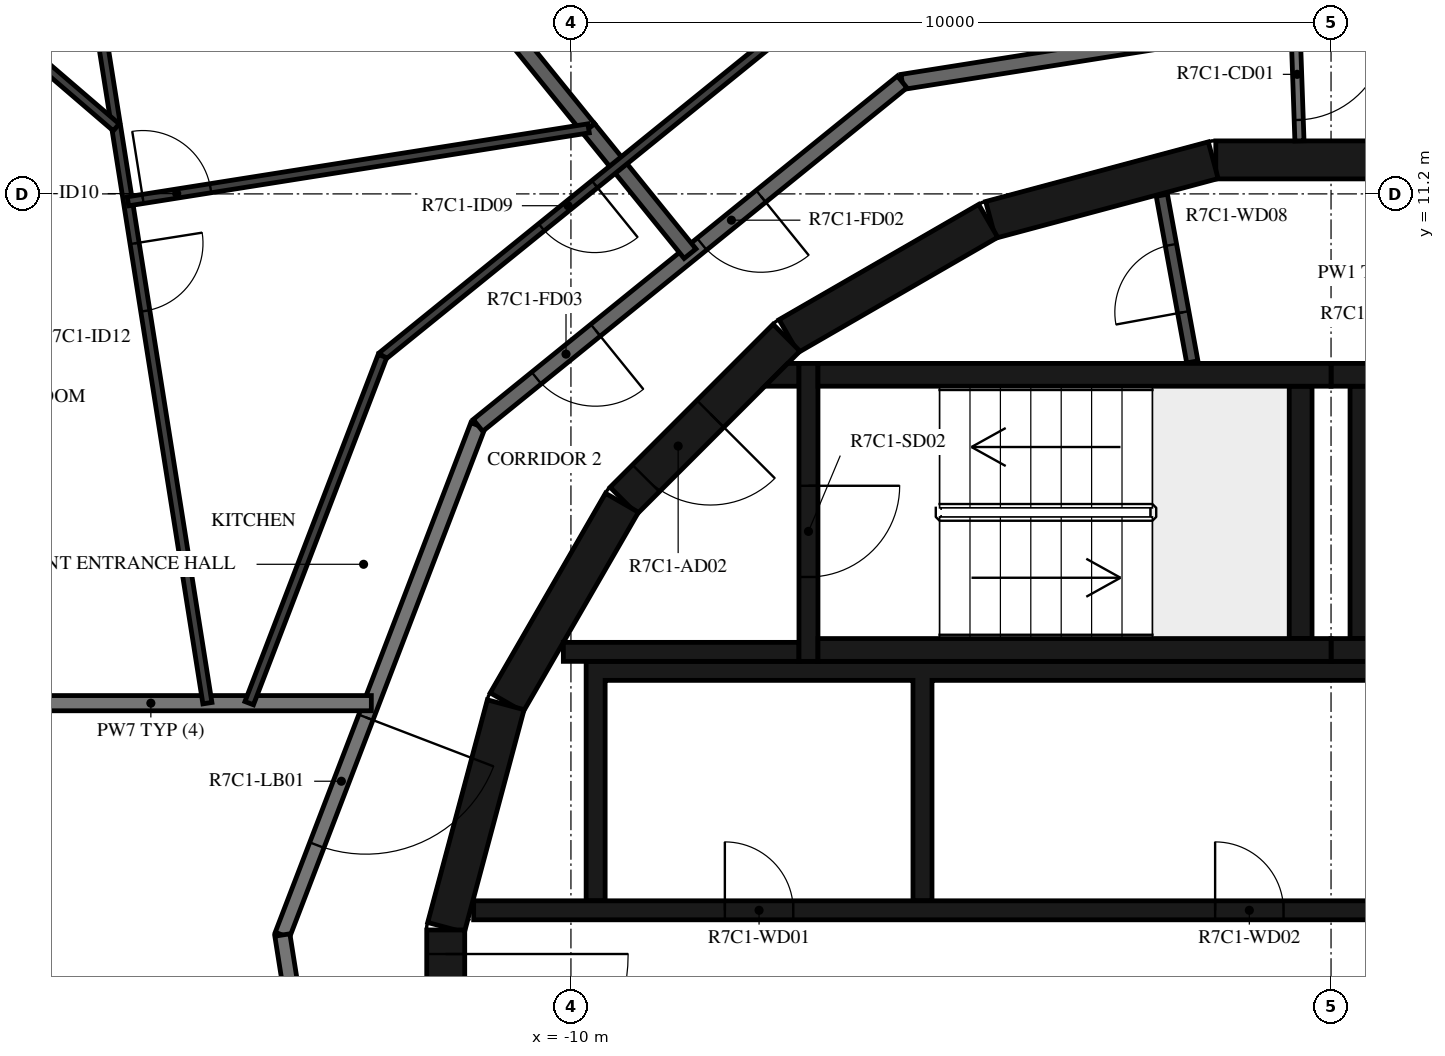
"""IFC4 building model, lengths in metres.
Left out: names, types, materials, properties, quantities, classifications, styles, units other than length and angle.
Written with IfcOpenShell. Run it as: python <this file> out.ifc"""

import sys

from ifc_helpers import new_model, si_unit, direction, frame, frame_2d, origin, place, context, subcontext, project, spatial, polyline, rectangle, outline, extrude, element, fill, save


model = new_model("IFC4")
c1 = context("Model", 3, precision=1e-05, world=origin(), true_north=direction((0.0, 1.0)))
c2 = subcontext(c1, "Body", "Model", "MODEL_VIEW")
j1 = project(units=[si_unit("LENGTHUNIT", "METRE"), si_unit("PLANEANGLEUNIT", "RADIAN")], contexts=[c1])
p1 = place(None, origin())
s1 = spatial("IfcSite", under=j1, at=p1, CompositionType="ELEMENT")
p2 = place(p1, origin())
s2 = spatial("IfcBuilding", under=s1, at=p2, CompositionType="ELEMENT")
p3 = place(p2, frame((0.0, 0.0, 287.9)))
s3 = spatial("IfcBuildingStorey", under=s2, at=p3, CompositionType="ELEMENT", Elevation=287.9)
for number, where, z_axis, x_axis in (
    (1, (1.516, 11.647, 0.0), (0.0, 0.0, 1.0), (-1.0, 0.0, 0.0)),
    (2, (-1.55, 11.643, 0.0), (0.0, 0.0, 1.0), (-0.966, -0.259, 0.0)),
    (3, (-4.51, 10.845, 0.0), (0.0, 0.0, 1.0), (-0.866, -0.5, 0.0)),
):
    element("IfcWall", number, at=place(p3, frame(where, z_axis=z_axis, x_axis=x_axis)), inside=s3, PredefinedType="SHEAR", context=c2, shape_type="SweptSolid", body=[
        extrude(rectangle(XDim=3.033, YDim=0.5, at=frame_2d((1.516, 0.0))), origin(), (0.0, 0.0, 1.0), 3.05),
    ])
p4 = place(p3, frame((-7.164, 9.308, 0.0), z_axis=(0.0, 0.0, 1.0), x_axis=(-0.707106781187, -0.707106781187, 0.0)))
e4 = element("IfcWall", 4, at=p4, inside=s3, PredefinedType="SHEAR", context=c2, shape_type="SweptSolid", body=[
    extrude(rectangle(XDim=3.032, YDim=0.5, at=frame_2d((1.516, 0.0))), origin(), (0.0, 0.0, 1.0), 3.05),
])
p5 = place(p4, frame((1.416, 0.0, 0.0)))
e5 = element("IfcOpeningElement", 5, at=p5, cuts=e4, PredefinedType="OPENING", context=c2, shape_type="SweptSolid", body=[
    extrude(rectangle(XDim=1.2, YDim=2.1, at=frame_2d((0.6, 1.05))), frame((0.0, 0.26, 0.0), z_axis=(0.0, -1.0, 0.0), x_axis=(1.0, 0.0, 0.0)), (0.0, 0.0, 1.0), 0.52),
])
for number, where, z_axis, x_axis in (
    (6, (-9.329, 7.137, 0.0), (0.0, 0.0, 1.0), (-0.5, -0.866, 0.0)),
    (7, (-10.858, 4.479, 0.0), (0.0, 0.0, 1.0), (-0.259, -0.966, 0.0)),
):
    element("IfcWall", number, at=place(p3, frame(where, z_axis=z_axis, x_axis=x_axis)), inside=s3, PredefinedType="SHEAR", context=c2, shape_type="SweptSolid", body=[
        extrude(rectangle(XDim=3.033, YDim=0.5, at=frame_2d((1.516, 0.0))), origin(), (0.0, 0.0, 1.0), 3.05),
    ])
p6 = place(p3, frame((-11.647, 1.516, 0.0), z_axis=(0.0, 0.0, 1.0), x_axis=(0.0, -1.0, 0.0)))
e8 = element("IfcWall", 8, at=p6, inside=s3, PredefinedType="SHEAR", context=c2, shape_type="SweptSolid", body=[
    extrude(rectangle(XDim=3.033, YDim=0.5, at=frame_2d((1.516, 0.0))), origin(), (0.0, 0.0, 1.0), 3.05),
])
p7 = place(p6, frame((0.316, 0.0, 0.0)))
e9 = element("IfcOpeningElement", 9, at=p7, cuts=e8, PredefinedType="OPENING", context=c2, shape_type="SweptSolid", body=[
    extrude(rectangle(XDim=2.4, YDim=2.1, at=frame_2d((1.2, 1.05))), frame((0.0, 0.26, 0.0), z_axis=(0.0, -1.0, 0.0), x_axis=(1.0, 0.0, 0.0)), (0.0, 0.0, 1.0), 0.52),
])
for number, where, z_axis, x_axis in (
    (10, (0.0, 5.2, 0.0), (0.0, 0.0, 1.0), (1.0, 0.0, 0.0)),
    (11, (0.0, 8.82, 0.0), (0.0, 0.0, 1.0), (1.0, 0.0, 0.0)),
):
    element("IfcWall", number, at=place(p3, frame(where, z_axis=z_axis, x_axis=x_axis)), inside=s3, PredefinedType="SHEAR", context=c2, shape_type="SweptSolid", body=[
        extrude(rectangle(XDim=6.75, YDim=0.3, at=frame_2d((3.375, 0.0))), origin(), (0.0, 0.0, 1.0), 3.05),
    ])
p8 = place(p3, frame((0.4, 5.35, 0.0), z_axis=(0.0, 0.0, 1.0), x_axis=(0.0, 1.0, 0.0)))
e12 = element("IfcWall", 12, at=p8, inside=s3, PredefinedType="SHEAR", context=c2, shape_type="SweptSolid", body=[
    extrude(rectangle(XDim=3.32, YDim=0.3, at=frame_2d((1.66, 0.0))), origin(), (0.0, 0.0, 1.0), 3.05),
])
for number, where, z_axis, x_axis in (
    (13, (-6.75, 5.2, 0.0), (0.0, 0.0, 1.0), (1.0, 0.0, 0.0)),
    (14, (-6.75, 8.82, 0.0), (0.0, 0.0, 1.0), (1.0, 0.0, 0.0)),
):
    element("IfcWall", number, at=place(p3, frame(where, z_axis=z_axis, x_axis=x_axis)), inside=s3, PredefinedType="SHEAR", context=c2, shape_type="SweptSolid", body=[
        extrude(rectangle(XDim=6.75, YDim=0.3, at=frame_2d((3.375, 0.0))), origin(), (0.0, 0.0, 1.0), 3.05),
    ])
p9 = place(p3, frame((-0.4, 5.35, 0.0), z_axis=(0.0, 0.0, 1.0), x_axis=(0.0, 1.0, 0.0)))
e15 = element("IfcWall", 15, at=p9, inside=s3, PredefinedType="SHEAR", context=c2, shape_type="SweptSolid", body=[
    extrude(rectangle(XDim=3.32, YDim=0.3, at=frame_2d((1.66, 0.0))), origin(), (0.0, 0.0, 1.0), 3.05),
])
p10 = place(p3, frame((-6.875, 8.97, 0.0), z_axis=(0.0, 0.0, 1.0), x_axis=(0.0, -1.0, 0.0)))
e16 = element("IfcWall", 16, at=p10, inside=s3, PredefinedType="SHEAR", context=c2, shape_type="SweptSolid", body=[
    extrude(rectangle(XDim=3.92, YDim=0.25, at=frame_2d((1.96, 0.0))), origin(), (0.0, 0.0, 1.0), 3.05),
])
p11 = place(p10, frame((1.61, 0.0, 0.0)))
e17 = element("IfcOpeningElement", 17, at=p11, cuts=e16, PredefinedType="OPENING", context=c2, shape_type="SweptSolid", body=[
    extrude(rectangle(XDim=1.2, YDim=2.1, at=frame_2d((0.6, 1.05))), frame((0.0, 0.135, 0.0), z_axis=(0.0, -1.0, 0.0), x_axis=(1.0, 0.0, 0.0)), (0.0, 0.0, 1.0), 0.27),
])
p12 = place(p3, frame((-7.0, 5.175, 0.0), z_axis=(0.0, 0.0, 1.0), x_axis=(-1.0, 0.0, 0.0)))
e18 = element("IfcWall", 18, at=p12, inside=s3, PredefinedType="SHEAR", context=c2, shape_type="SweptSolid", body=[
    extrude(rectangle(XDim=3.1, YDim=0.25, at=frame_2d((1.55, 0.0))), origin(), (0.0, 0.0, 1.0), 3.05),
])
p13 = place(p3, origin())
e19 = element("IfcWall", 19, at=p13, inside=s3, PredefinedType="SHEAR", context=c2, shape_type="SweptSolid", body=[
    extrude(outline(polyline([(-7.148, 8.97), (-7.0, 8.97), (-7.0, 8.67), (-7.448, 8.67), (-7.148, 8.97)])), origin(), (0.0, 0.0, 1.0), 3.05),
])
p14 = place(p3, origin())
e20 = element("IfcWall", 20, at=p14, inside=s3, PredefinedType="SHEAR", context=c2, shape_type="SweptSolid", body=[
    extrude(outline(polyline([(-9.8, 1.9), (-9.55, 1.9), (-9.55, 4.8), (-5.5, 4.8), (-5.5, 1.9), (-5.25, 1.9), (-5.25, 4.8), (3.1, 4.8), (3.1, 1.9), (3.35, 1.9), (3.35, 4.8), (5.25, 4.8), (5.25, 1.9), (5.5, 1.9), (5.5, 4.8), (7.4, 4.8), (7.4, 1.9), (7.65, 1.9), (7.65, 4.8), (9.55, 4.8), (9.55, 1.9), (9.8, 1.9), (9.8, 4.8), (9.8, 5.05), (-9.8, 5.05), (-9.8, 4.8), (-9.8, 1.9)])), origin(), (0.0, 0.0, 1.0), 3.05),
])
p15 = place(p3, frame((-11.28, 1.775, 0.0), z_axis=(0.0, 0.0, 1.0), x_axis=(1.0, 0.0, 0.0)))
e21 = element("IfcWall", 21, at=p15, inside=s3, PredefinedType="SHEAR", context=c2, shape_type="SweptSolid", body=[
    extrude(rectangle(XDim=14.38, YDim=0.25, at=frame_2d((7.19, 0.0))), origin(), (0.0, 0.0, 1.0), 3.05),
])
p16 = place(p15, frame((3.305, 0.0, 0.0)))
e22 = element("IfcOpeningElement", 22, at=p16, cuts=e21, PredefinedType="OPENING", context=c2, shape_type="SweptSolid", body=[
    extrude(rectangle(XDim=0.9, YDim=2.1, at=frame_2d((0.45, 1.05))), frame((0.0, 0.135, 0.0), z_axis=(0.0, -1.0, 0.0), x_axis=(1.0, 0.0, 0.0)), (0.0, 0.0, 1.0), 0.27),
])
p17 = place(p15, frame((9.755, 0.0, 0.0)))
e23 = element("IfcOpeningElement", 23, at=p17, cuts=e21, PredefinedType="OPENING", context=c2, shape_type="SweptSolid", body=[
    extrude(rectangle(XDim=0.9, YDim=2.1, at=frame_2d((0.45, 1.05))), frame((0.0, 0.135, 0.0), z_axis=(0.0, -1.0, 0.0), x_axis=(1.0, 0.0, 0.0)), (0.0, 0.0, 1.0), 0.27),
])
p18 = place(p3, frame((-1.825, 8.99, 0.0), z_axis=(0.0, 0.0, 1.0), x_axis=(-0.179955206115, 0.983674805915, 0.0)))
e24 = element("IfcWall", 24, at=p18, inside=s3, PredefinedType="PARTITIONING", context=c2, shape_type="SweptSolid", body=[
    extrude(rectangle(XDim=2.229, YDim=0.15, at=frame_2d((1.115, 0.0))), origin(), (0.0, 0.0, 1.0), 3.05),
])
p19 = place(p18, frame((0.665, 0.0, 0.0)))
e25 = element("IfcOpeningElement", 25, at=p19, cuts=e24, PredefinedType="OPENING", context=c2, shape_type="SweptSolid", body=[
    extrude(rectangle(XDim=0.9, YDim=2.1, at=frame_2d((0.45, 1.05))), frame((0.0, 0.085, 0.0), z_axis=(0.0, -1.0, 0.0), x_axis=(1.0, 0.0, 0.0)), (0.0, 0.0, 1.0), 0.17),
])
p20 = place(p3, frame((-0.471, 13.492, 0.0), z_axis=(0.0, 0.0, 1.0), x_axis=(0.034873173869, -0.999391745886, 0.0)))
e26 = element("IfcWall", 26, at=p20, inside=s3, PredefinedType="PARTITIONING", context=c2, shape_type="SweptSolid", body=[
    extrude(rectangle(XDim=1.596, YDim=0.12, at=frame_2d((0.798, 0.0))), origin(), (0.0, 0.0, 1.0), 3.05),
])
p21 = place(p20, frame((0.12, 0.0, 0.0)))
e27 = element("IfcOpeningElement", 27, at=p21, cuts=e26, PredefinedType="OPENING", context=c2, shape_type="SweptSolid", body=[
    extrude(rectangle(XDim=1.2, YDim=2.1, at=frame_2d((0.6, 1.05))), frame((0.0, 0.07, 0.0), z_axis=(0.0, -1.0, 0.0), x_axis=(1.0, 0.0, 0.0)), (0.0, 0.0, 1.0), 0.14),
])
p22 = place(p3, frame((1.45, 13.797, 0.0), z_axis=(0.0, 0.0, 1.0), x_axis=(-0.987690361611, -0.156421704315, 0.0)))
e28 = element("IfcWall", 28, at=p22, inside=s3, PredefinedType="STANDARD", context=c2, shape_type="SweptSolid", body=[
    extrude(rectangle(XDim=7.181, YDim=0.2, at=frame_2d((3.591, 0.0))), origin(), (0.0, 0.0, 1.0), 3.05),
])
p23 = place(p3, frame((-11.223, 8.154, 0.0), z_axis=(0.0, 0.0, 1.0), x_axis=(-0.358341090983, -0.93359073609, 0.0)))
e29 = element("IfcWall", 29, at=p23, inside=s3, PredefinedType="STANDARD", context=c2, shape_type="SweptSolid", body=[
    extrude(rectangle(XDim=7.181, YDim=0.2, at=frame_2d((3.59, 0.0))), origin(), (0.0, 0.0, 1.0), 3.05),
])
p24 = place(p23, frame((4.114, 0.0, 0.0)))
e30 = element("IfcOpeningElement", 30, at=p24, cuts=e29, PredefinedType="OPENING", context=c2, shape_type="SweptSolid", body=[
    extrude(rectangle(XDim=1.8, YDim=2.1, at=frame_2d((0.9, 1.05))), frame((0.0, 0.11, 0.0), z_axis=(0.0, -1.0, 0.0), x_axis=(1.0, 0.0, 0.0)), (0.0, 0.0, 1.0), 0.22),
])
p25 = place(p3, frame((-13.797, 1.45, 0.0), z_axis=(0.0, 0.0, 1.0), x_axis=(0.156421704315, -0.987690361611, 0.0)))
e31 = element("IfcWall", 31, at=p25, inside=s3, PredefinedType="STANDARD", context=c2, shape_type="SweptSolid", body=[
    extrude(rectangle(XDim=7.181, YDim=0.2, at=frame_2d((3.591, 0.0))), origin(), (0.0, 0.0, 1.0), 3.05),
])
p26 = place(p3, frame((-5.643, 12.673, 0.0), z_axis=(0.0, 0.0, 1.0), x_axis=(-0.777160148113, -0.629302871585, 0.0)))
e32 = element("IfcWall", 32, at=p26, inside=s3, PredefinedType="STANDARD", context=c2, shape_type="SweptSolid", body=[
    extrude(rectangle(XDim=7.181, YDim=0.2, at=frame_2d((3.59, 0.0))), origin(), (0.0, 0.0, 1.0), 3.05),
])
p27 = place(p26, frame((2.39, 0.0, 0.0)))
e33 = element("IfcOpeningElement", 33, at=p27, cuts=e32, PredefinedType="OPENING", context=c2, shape_type="SweptSolid", body=[
    extrude(rectangle(XDim=1.0, YDim=2.1, at=frame_2d((0.5, 1.05))), frame((0.0, 0.11, 0.0), z_axis=(0.0, -1.0, 0.0), x_axis=(1.0, 0.0, 0.0)), (0.0, 0.0, 1.0), 0.22),
])
p28 = place(p26, frame((5.19, 0.0, 0.0)))
e34 = element("IfcOpeningElement", 34, at=p28, cuts=e32, PredefinedType="OPENING", context=c2, shape_type="SweptSolid", body=[
    extrude(rectangle(XDim=1.0, YDim=2.1, at=frame_2d((0.5, 1.05))), frame((0.0, 0.11, 0.0), z_axis=(0.0, -1.0, 0.0), x_axis=(1.0, 0.0, 0.0)), (0.0, 0.0, 1.0), 0.22),
])
p29 = place(p3, frame((-12.626, 4.5, 0.0), z_axis=(0.0, 0.0, 1.0), x_axis=(-1.0, 0.0, 0.0)))
e35 = element("IfcWall", 35, at=p29, inside=s3, PredefinedType="STANDARD", context=c2, shape_type="SweptSolid", body=[
    extrude(rectangle(XDim=5.802, YDim=0.2, at=frame_2d((2.901, 0.0))), origin(), (0.0, 0.0, 1.0), 3.05),
])
p30 = place(p3, frame((-9.768, 12.062, 0.0), z_axis=(0.0, 0.0, 1.0), x_axis=(0.629274383598, -0.777183215302, 0.0)))
e36 = element("IfcWall", 36, at=p30, inside=s3, PredefinedType="STANDARD", context=c2, shape_type="SweptSolid", body=[
    extrude(rectangle(XDim=2.121, YDim=0.2, at=frame_2d((1.061, 0.0))), origin(), (0.0, 0.0, 1.0), 3.05),
])
p31 = place(p3, frame((-10.779, 13.311, 0.0), z_axis=(0.0, 0.0, 1.0), x_axis=(0.629373100483, -0.77710327524, 0.0)))
e37 = element("IfcWall", 37, at=p31, inside=s3, PredefinedType="STANDARD", context=c2, shape_type="SweptSolid", body=[
    extrude(rectangle(XDim=1.606, YDim=0.2, at=frame_2d((0.803, 0.0))), origin(), (0.0, 0.0, 1.0), 3.05),
])
p32 = place(p3, frame((-7.363, 13.21, 0.0), z_axis=(0.0, 0.0, 1.0), x_axis=(-0.777139504663, -0.629328364443, 0.0)))
e38 = element("IfcWall", 38, at=p32, inside=s3, PredefinedType="PARTITIONING", context=c2, shape_type="SweptSolid", body=[
    extrude(rectangle(XDim=6.584, YDim=0.12, at=frame_2d((3.292, 0.0))), origin(), (0.0, 0.0, 1.0), 3.05),
])
p33 = place(p32, frame((2.991, 0.0, 0.0)))
e39 = element("IfcOpeningElement", 39, at=p33, cuts=e38, PredefinedType="OPENING", context=c2, shape_type="SweptSolid", body=[
    extrude(rectangle(XDim=0.9, YDim=2.1, at=frame_2d((0.45, 1.05))), frame((0.0, 0.07, 0.0), z_axis=(0.0, -1.0, 0.0), x_axis=(1.0, 0.0, 0.0)), (0.0, 0.0, 1.0), 0.14),
])
p34 = place(p3, frame((-12.479, 9.067, 0.0), z_axis=(0.0, 0.0, 1.0), x_axis=(-0.358387060848, -0.933573090131, 0.0)))
e40 = element("IfcWall", 40, at=p34, inside=s3, PredefinedType="PARTITIONING", context=c2, shape_type="SweptSolid", body=[
    extrude(rectangle(XDim=4.892, YDim=0.12, at=frame_2d((2.446, 0.0))), origin(), (0.0, 0.0, 1.0), 3.05),
])
p35 = place(p3, frame((-16.266, 13.865, 0.0), z_axis=(0.0, 0.0, 1.0), x_axis=(0.156422690833, -0.987690205374, 0.0)))
e41 = element("IfcWall", 41, at=p35, inside=s3, PredefinedType="PARTITIONING", context=c2, shape_type="SweptSolid", body=[
    extrude(rectangle(XDim=9.482, YDim=0.12, at=frame_2d((4.741, 0.0))), origin(), (0.0, 0.0, 1.0), 3.05),
])
p36 = place(p35, frame((3.357, 0.0, 0.0)))
e42 = element("IfcOpeningElement", 42, at=p36, cuts=e41, PredefinedType="OPENING", context=c2, shape_type="SweptSolid", body=[
    extrude(rectangle(XDim=0.9, YDim=2.1, at=frame_2d((0.45, 1.05))), frame((0.0, 0.07, 0.0), z_axis=(0.0, -1.0, 0.0), x_axis=(1.0, 0.0, 0.0)), (0.0, 0.0, 1.0), 0.14),
])
p37 = place(p3, frame((-15.828, 11.102, 0.0), z_axis=(0.0, 0.0, 1.0), x_axis=(0.98768671358, 0.156444737262, 0.0)))
e43 = element("IfcWall", 43, at=p37, inside=s3, PredefinedType="PARTITIONING", context=c2, shape_type="SweptSolid", body=[
    extrude(rectangle(XDim=6.136, YDim=0.12, at=frame_2d((3.068, 0.0))), origin(), (0.0, 0.0, 1.0), 3.05),
])
p38 = place(p37, frame((0.2, 0.0, 0.0)))
e44 = element("IfcOpeningElement", 44, at=p38, cuts=e43, PredefinedType="OPENING", context=c2, shape_type="SweptSolid", body=[
    extrude(rectangle(XDim=0.9, YDim=2.1, at=frame_2d((0.45, 1.05))), frame((0.0, 0.07, 0.0), z_axis=(0.0, -1.0, 0.0), x_axis=(1.0, 0.0, 0.0)), (0.0, 0.0, 1.0), 0.14),
])
p39 = place(p3, frame((-19.913, 15.451, 0.0), z_axis=(0.0, 0.0, 1.0), x_axis=(0.758627615547, -0.651524474544, 0.0)))
e45 = element("IfcWall", 45, at=p39, inside=s3, PredefinedType="PARTITIONING", context=c2, shape_type="SweptSolid", body=[
    extrude(rectangle(XDim=5.181, YDim=0.12, at=frame_2d((2.591, 0.0))), origin(), (0.0, 0.0, 1.0), 3.05),
])
p40 = place(p11, origin())
e46 = element("IfcDoor", 46, at=p40, inside=s3, OperationType="SINGLE_SWING_LEFT", PredefinedType="DOOR", context=c2, shape_type="SweptSolid", body=[
    extrude(rectangle(XDim=1.2, YDim=2.1, at=frame_2d((0.6, 1.05))), frame((0.0, 0.025, 0.0), z_axis=(0.0, -1.0, 0.0), x_axis=(1.0, 0.0, 0.0)), (0.0, 0.0, 1.0), 0.05),
])
fill(e17, e46)
p41 = place(p5, origin())
e47 = element("IfcDoor", 47, at=p41, inside=s3, OperationType="SINGLE_SWING_RIGHT", PredefinedType="DOOR", context=c2, shape_type="SweptSolid", body=[
    extrude(rectangle(XDim=1.2, YDim=2.1, at=frame_2d((0.6, 1.05))), frame((0.0, 0.025, 0.0), z_axis=(0.0, -1.0, 0.0), x_axis=(1.0, 0.0, 0.0)), (0.0, 0.0, 1.0), 0.05),
])
fill(e5, e47)
p42 = place(p7, origin())
e48 = element("IfcDoor", 48, at=p42, inside=s3, OperationType="DOUBLE_DOOR_SINGLE_SWING", PredefinedType="DOOR", context=c2, shape_type="SweptSolid", body=[
    extrude(rectangle(XDim=2.4, YDim=2.1, at=frame_2d((1.2, 1.05))), frame((0.0, 0.025, 0.0), z_axis=(0.0, -1.0, 0.0), x_axis=(1.0, 0.0, 0.0)), (0.0, 0.0, 1.0), 0.05),
])
fill(e9, e48)
p43 = place(p16, origin())
e49 = element("IfcDoor", 49, at=p43, inside=s3, OperationType="SINGLE_SWING_LEFT", PredefinedType="DOOR", context=c2, shape_type="SweptSolid", body=[
    extrude(rectangle(XDim=0.9, YDim=2.1, at=frame_2d((0.45, 1.05))), frame((0.0, 0.025, 0.0), z_axis=(0.0, -1.0, 0.0), x_axis=(1.0, 0.0, 0.0)), (0.0, 0.0, 1.0), 0.05),
])
fill(e22, e49)
p44 = place(p17, origin())
e50 = element("IfcDoor", 50, at=p44, inside=s3, OperationType="SINGLE_SWING_RIGHT", PredefinedType="DOOR", context=c2, shape_type="SweptSolid", body=[
    extrude(rectangle(XDim=0.9, YDim=2.1, at=frame_2d((0.45, 1.05))), frame((0.0, 0.025, 0.0), z_axis=(0.0, -1.0, 0.0), x_axis=(1.0, 0.0, 0.0)), (0.0, 0.0, 1.0), 0.05),
])
fill(e23, e50)
p45 = place(p19, origin())
e51 = element("IfcDoor", 51, at=p45, inside=s3, OperationType="SINGLE_SWING_RIGHT", PredefinedType="DOOR", context=c2, shape_type="SweptSolid", body=[
    extrude(rectangle(XDim=0.9, YDim=2.1, at=frame_2d((0.45, 1.05))), frame((0.0, 0.025, 0.0), z_axis=(0.0, -1.0, 0.0), x_axis=(1.0, 0.0, 0.0)), (0.0, 0.0, 1.0), 0.05),
])
fill(e25, e51)
p46 = place(p27, origin())
e52 = element("IfcDoor", 52, at=p46, inside=s3, OperationType="SINGLE_SWING_RIGHT", PredefinedType="DOOR", context=c2, shape_type="SweptSolid", body=[
    extrude(rectangle(XDim=1.0, YDim=2.1, at=frame_2d((0.5, 1.05))), frame((0.0, 0.025, 0.0), z_axis=(0.0, -1.0, 0.0), x_axis=(1.0, 0.0, 0.0)), (0.0, 0.0, 1.0), 0.05),
])
fill(e33, e52)
p47 = place(p28, origin())
e53 = element("IfcDoor", 53, at=p47, inside=s3, OperationType="SINGLE_SWING_LEFT", PredefinedType="DOOR", context=c2, shape_type="SweptSolid", body=[
    extrude(rectangle(XDim=1.0, YDim=2.1, at=frame_2d((0.5, 1.05))), frame((0.0, 0.025, 0.0), z_axis=(0.0, -1.0, 0.0), x_axis=(1.0, 0.0, 0.0)), (0.0, 0.0, 1.0), 0.05),
])
fill(e34, e53)
p48 = place(p33, origin())
e54 = element("IfcDoor", 54, at=p48, inside=s3, OperationType="SINGLE_SWING_LEFT", PredefinedType="DOOR", context=c2, shape_type="SweptSolid", body=[
    extrude(rectangle(XDim=0.9, YDim=2.1, at=frame_2d((0.45, 1.05))), frame((0.0, 0.025, 0.0), z_axis=(0.0, -1.0, 0.0), x_axis=(1.0, 0.0, 0.0)), (0.0, 0.0, 1.0), 0.05),
])
fill(e39, e54)
p49 = place(p38, origin())
e55 = element("IfcDoor", 55, at=p49, inside=s3, OperationType="SINGLE_SWING_LEFT", PredefinedType="DOOR", context=c2, shape_type="SweptSolid", body=[
    extrude(rectangle(XDim=0.9, YDim=2.1, at=frame_2d((0.45, 1.05))), frame((0.0, 0.025, 0.0), z_axis=(0.0, -1.0, 0.0), x_axis=(1.0, 0.0, 0.0)), (0.0, 0.0, 1.0), 0.05),
])
fill(e44, e55)
p50 = place(p36, origin())
e56 = element("IfcDoor", 56, at=p50, inside=s3, OperationType="SINGLE_SWING_LEFT", PredefinedType="DOOR", context=c2, shape_type="SweptSolid", body=[
    extrude(rectangle(XDim=0.9, YDim=2.1, at=frame_2d((0.45, 1.05))), frame((0.0, 0.025, 0.0), z_axis=(0.0, -1.0, 0.0), x_axis=(1.0, 0.0, 0.0)), (0.0, 0.0, 1.0), 0.05),
])
fill(e42, e56)
p51 = place(p21, origin())
e57 = element("IfcDoor", 57, at=p51, inside=s3, OperationType="DOUBLE_DOOR_SINGLE_SWING", PredefinedType="DOOR", context=c2, shape_type="SweptSolid", body=[
    extrude(rectangle(XDim=1.2, YDim=2.1, at=frame_2d((0.6, 1.05))), frame((0.0, 0.025, 0.0), z_axis=(0.0, -1.0, 0.0), x_axis=(1.0, 0.0, 0.0)), (0.0, 0.0, 1.0), 0.05),
])
fill(e27, e57)
p52 = place(p24, origin())
e58 = element("IfcDoor", 58, at=p52, inside=s3, OperationType="DOUBLE_DOOR_SINGLE_SWING", PredefinedType="DOOR", context=c2, shape_type="SweptSolid", body=[
    extrude(rectangle(XDim=1.8, YDim=2.1, at=frame_2d((0.9, 1.05))), frame((0.0, 0.025, 0.0), z_axis=(0.0, -1.0, 0.0), x_axis=(1.0, 0.0, 0.0)), (0.0, 0.0, 1.0), 0.05),
])
fill(e30, e58)
save(model, sys.argv[1])
